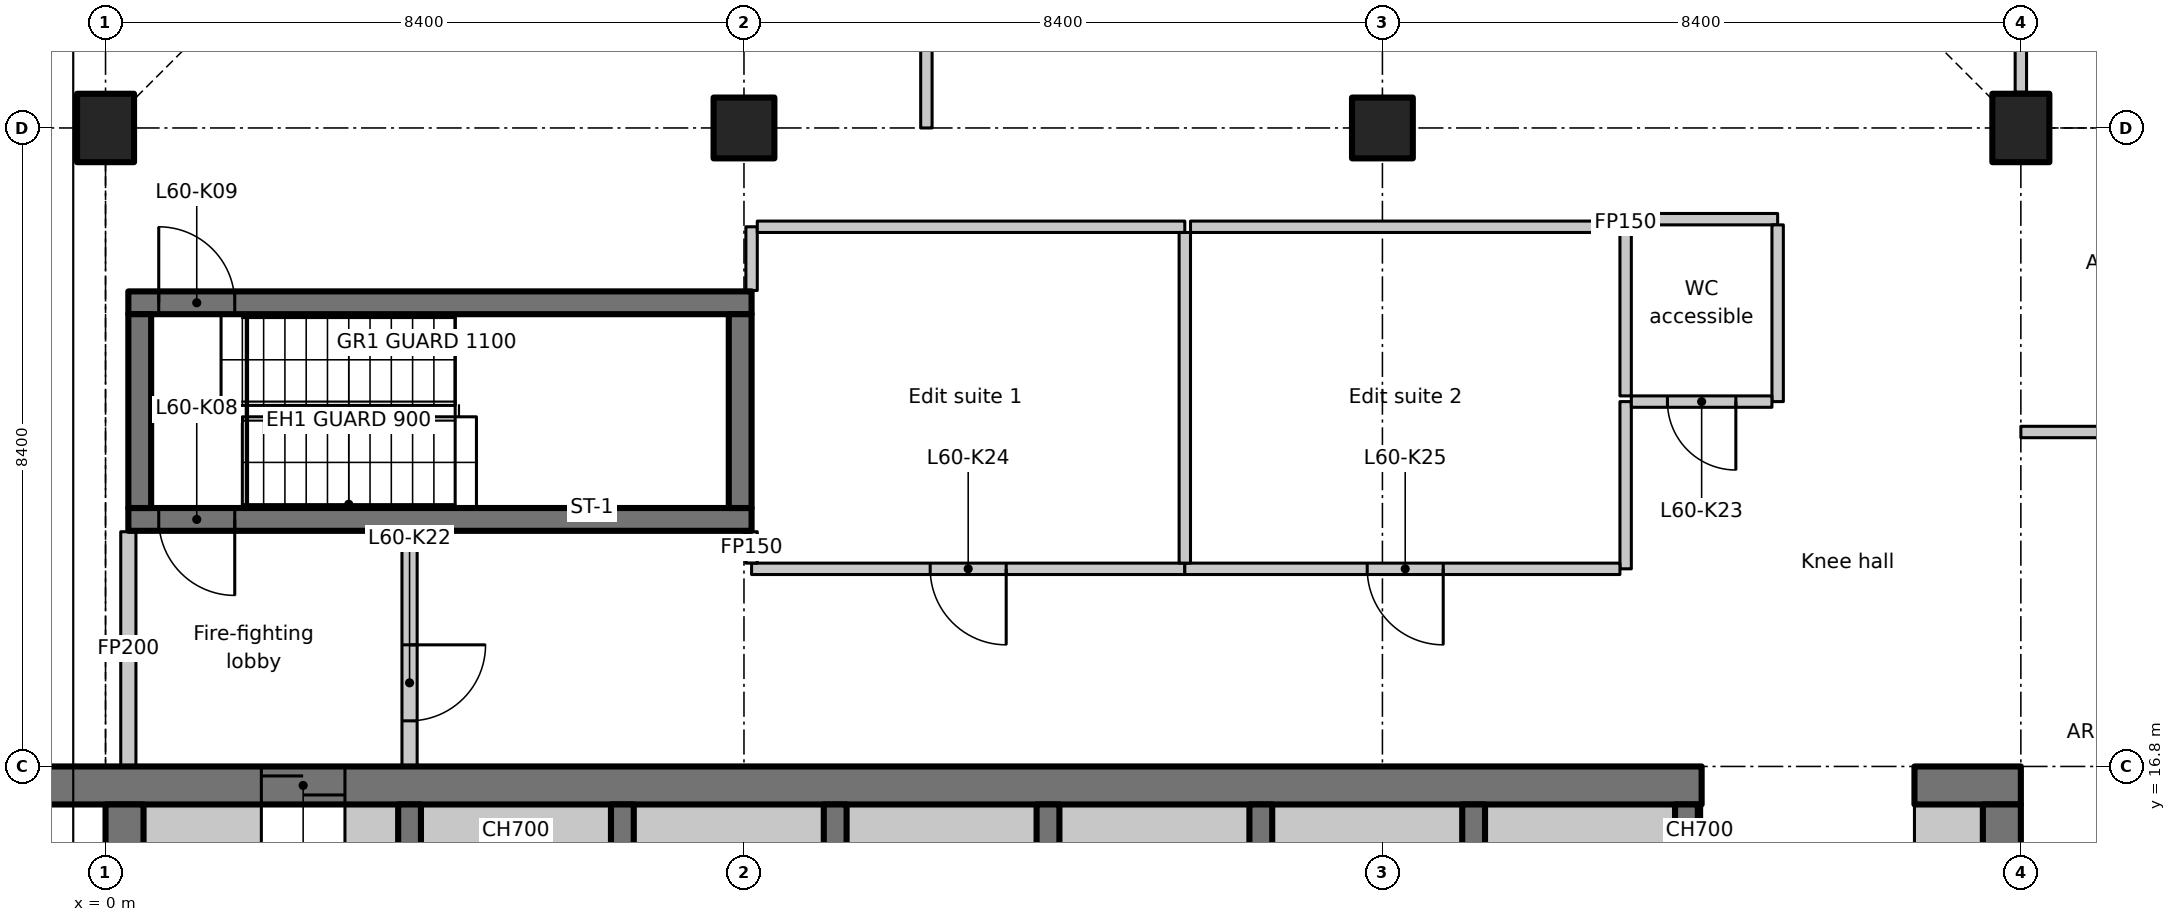
"""IFC4 building model, lengths in metres.
Left out: names, types, materials, properties, quantities, classifications, styles, units other than length and angle.
Written with IfcOpenShell. Run it as: python <this file> out.ifc"""

import sys

from ifc_helpers import new_model, si_unit, direction, frame, frame_2d, origin, origin_2d, place, context, subcontext, project, spatial, rectangle, extrude, element, fill, save


model = new_model("IFC4")
c1 = context("Model", 3, precision=1e-05, world=origin(), true_north=direction((0.0, 1.0)))
c2 = subcontext(c1, "Body", "Model", "MODEL_VIEW")
j1 = project(units=[si_unit("LENGTHUNIT", "METRE"), si_unit("PLANEANGLEUNIT", "RADIAN")], contexts=[c1])
p1 = place(None, origin())
s1 = spatial("IfcSite", under=j1, at=p1, CompositionType="ELEMENT")
p2 = place(p1, origin())
s2 = spatial("IfcBuilding", under=s1, at=p2, CompositionType="ELEMENT")
p3 = place(p2, frame((0.0, 0.0, 237.3)))
s3 = spatial("IfcBuildingStorey", under=s2, at=p3, CompositionType="ELEMENT", Elevation=237.3)
p4 = place(p3, frame((0.0, 25.2, 0.0), z_axis=(0.0, 0.0, 1.0), x_axis=(1.0, 0.0, 0.0)))
e1 = element("IfcColumn", 1, at=p4, inside=s3, PredefinedType="COLUMN", context=c2, shape_type="SweptSolid", body=[
    extrude(rectangle(XDim=0.75, YDim=0.9, at=origin_2d()), origin(), (0.0, 0.0, 1.0), 3.35),
])
for number, where, z_axis, x_axis in (
    (2, (8.4, 25.2, 0.0), (0.0, 0.0, 1.0), (1.0, 0.0, 0.0)),
    (3, (16.8, 25.2, 0.0), (0.0, 0.0, 1.0), (1.0, 0.0, 0.0)),
):
    element("IfcColumn", number, at=place(p3, frame(where, z_axis=z_axis, x_axis=x_axis)), inside=s3, PredefinedType="COLUMN", context=c2, shape_type="SweptSolid", body=[
        extrude(rectangle(XDim=0.8, YDim=0.8, at=origin_2d()), origin(), (0.0, 0.0, 1.0), 3.35),
    ])
p5 = place(p3, frame((25.2, 25.2, 0.0), z_axis=(0.0, 0.0, 1.0), x_axis=(1.0, 0.0, 0.0)))
e4 = element("IfcColumn", 4, at=p5, inside=s3, PredefinedType="COLUMN", context=c2, shape_type="SweptSolid", body=[
    extrude(rectangle(XDim=0.75, YDim=0.9, at=origin_2d()), origin(), (0.0, 0.0, 1.0), 3.35),
])
p6 = place(p3, frame((-1.1, 16.55, 0.0), z_axis=(0.0, 0.0, 1.0), x_axis=(1.0, 0.0, 0.0)))
e5 = element("IfcWall", 5, at=p6, inside=s3, PredefinedType="SHEAR", context=c2, shape_type="SweptSolid", body=[
    extrude(rectangle(XDim=22.1, YDim=0.5, at=frame_2d((11.05, 0.0))), origin(), (0.0, 0.0, 1.0), 3.35),
])
p7 = place(p6, frame((3.15, 0.0, 0.0)))
e6 = element("IfcOpeningElement", 6, at=p7, cuts=e5, PredefinedType="OPENING", context=c2, shape_type="SweptSolid", body=[
    extrude(rectangle(XDim=1.1, YDim=2.3, at=frame_2d((0.55, 1.15))), frame((0.0, 0.26, 0.0), z_axis=(0.0, -1.0, 0.0), x_axis=(1.0, 0.0, 0.0)), (0.0, 0.0, 1.0), 0.52),
])
p8 = place(p3, frame((23.8, 16.55, 0.0), z_axis=(0.0, 0.0, 1.0), x_axis=(1.0, 0.0, 0.0)))
e7 = element("IfcWall", 7, at=p8, inside=s3, PredefinedType="SHEAR", context=c2, shape_type="SweptSolid", body=[
    extrude(rectangle(XDim=1.4, YDim=0.5, at=frame_2d((0.7, 0.0))), origin(), (0.0, 0.0, 1.0), 3.35),
])
p9 = place(p3, frame((0.25, 7.436, 0.0), z_axis=(0.0, 0.0, 1.0), x_axis=(0.0, 1.0, 0.0)))
e8 = element("IfcWall", 8, at=p9, inside=s3, PredefinedType="SHEAR", context=c2, shape_type="SweptSolid", body=[
    extrude(rectangle(XDim=8.864, YDim=0.5, at=frame_2d((4.432, 0.0))), origin(), (0.0, 0.0, 1.0), 3.35),
])
p10 = place(p3, frame((24.95, 12.6, 0.0), z_axis=(0.0, 0.0, 1.0), x_axis=(0.0, 1.0, 0.0)))
e9 = element("IfcWall", 9, at=p10, inside=s3, PredefinedType="SHEAR", context=c2, shape_type="SweptSolid", body=[
    extrude(rectangle(XDim=3.7, YDim=0.5, at=frame_2d((1.85, 0.0))), origin(), (0.0, 0.0, 1.0), 3.35),
])
p11 = place(p3, frame((0.5, 15.95, 0.0), z_axis=(0.0, 0.0, 1.0), x_axis=(1.0, 0.0, 0.0)))
e10 = element("IfcWall", 10, at=p11, inside=s3, PredefinedType="PARTITIONING", context=c2, shape_type="SweptSolid", body=[
    extrude(rectangle(XDim=1.55, YDim=0.7, at=frame_2d((0.775, 0.0))), origin(), (0.0, 0.0, 1.0), 3.35),
])
p12 = place(p3, frame((23.8, 15.95, 0.0), z_axis=(0.0, 0.0, 1.0), x_axis=(1.0, 0.0, 0.0)))
e11 = element("IfcWall", 11, at=p12, inside=s3, PredefinedType="PARTITIONING", context=c2, shape_type="SweptSolid", body=[
    extrude(rectangle(XDim=0.9, YDim=0.7, at=frame_2d((0.45, 0.0))), origin(), (0.0, 0.0, 1.0), 3.35),
])
for number, where, z_axis, x_axis in (
    (12, (4.0, 12.95, 0.0), (0.0, 0.0, 1.0), (0.0, 1.0, 0.0)),
    (13, (6.8, 12.95, 0.0), (0.0, 0.0, 1.0), (0.0, 1.0, 0.0)),
    (14, (9.6, 12.95, 0.0), (0.0, 0.0, 1.0), (0.0, 1.0, 0.0)),
    (15, (12.4, 12.95, 0.0), (0.0, 0.0, 1.0), (0.0, 1.0, 0.0)),
    (16, (15.2, 12.95, 0.0), (0.0, 0.0, 1.0), (0.0, 1.0, 0.0)),
    (17, (18.0, 12.95, 0.0), (0.0, 0.0, 1.0), (0.0, 1.0, 0.0)),
    (18, (20.8, 12.95, 0.0), (0.0, 0.0, 1.0), (0.0, 1.0, 0.0)),
):
    element("IfcWall", number, at=place(p3, frame(where, z_axis=z_axis, x_axis=x_axis)), inside=s3, PredefinedType="SHEAR", context=c2, shape_type="SweptSolid", body=[
        extrude(rectangle(XDim=3.35, YDim=0.3, at=frame_2d((1.675, 0.0))), origin(), (0.0, 0.0, 1.0), 3.35),
    ])
p13 = place(p3, frame((8.5, 20.05, 0.0), z_axis=(0.0, 0.0, 1.0), x_axis=(-1.0, 0.0, 0.0)))
e19 = element("IfcWall", 19, at=p13, inside=s3, PredefinedType="SHEAR", context=c2, shape_type="SweptSolid", body=[
    extrude(rectangle(XDim=8.2, YDim=0.3, at=frame_2d((4.1, 0.0))), origin(), (0.0, 0.0, 1.0), 3.35),
])
p14 = place(p13, frame((6.8, 0.0, 0.0)))
e20 = element("IfcOpeningElement", 20, at=p14, cuts=e19, PredefinedType="OPENING", context=c2, shape_type="SweptSolid", body=[
    extrude(rectangle(XDim=1.0, YDim=2.1, at=frame_2d((0.5, 1.05))), frame((0.0, 0.16, 0.0), z_axis=(0.0, -1.0, 0.0), x_axis=(1.0, 0.0, 0.0)), (0.0, 0.0, 1.0), 0.32),
])
p15 = place(p3, frame((0.3, 22.9, 0.0), z_axis=(0.0, 0.0, 1.0), x_axis=(1.0, 0.0, 0.0)))
e21 = element("IfcWall", 21, at=p15, inside=s3, PredefinedType="SHEAR", context=c2, shape_type="SweptSolid", body=[
    extrude(rectangle(XDim=8.2, YDim=0.3, at=frame_2d((4.1, 0.0))), origin(), (0.0, 0.0, 1.0), 3.35),
])
p16 = place(p15, frame((0.4, 0.0, 0.0)))
e22 = element("IfcOpeningElement", 22, at=p16, cuts=e21, PredefinedType="OPENING", context=c2, shape_type="SweptSolid", body=[
    extrude(rectangle(XDim=1.0, YDim=2.1, at=frame_2d((0.5, 1.05))), frame((0.0, 0.16, 0.0), z_axis=(0.0, -1.0, 0.0), x_axis=(1.0, 0.0, 0.0)), (0.0, 0.0, 1.0), 0.32),
])
for number, where, z_axis, x_axis in (
    (23, (0.45, 20.2, 0.0), (0.0, 0.0, 1.0), (0.0, 1.0, 0.0)),
    (24, (8.35, 20.2, 0.0), (0.0, 0.0, 1.0), (0.0, 1.0, 0.0)),
):
    element("IfcWall", number, at=place(p3, frame(where, z_axis=z_axis, x_axis=x_axis)), inside=s3, PredefinedType="SHEAR", context=c2, shape_type="SweptSolid", body=[
        extrude(rectangle(XDim=2.55, YDim=0.3, at=frame_2d((1.275, 0.0))), origin(), (0.0, 0.0, 1.0), 3.35),
    ])
p17 = place(p3, frame((0.3, 16.812, 0.0), z_axis=(0.0, 0.0, 1.0), x_axis=(0.0, 1.0, 0.0)))
e25 = element("IfcWall", 25, at=p17, inside=s3, PredefinedType="PARTITIONING", context=c2, shape_type="SweptSolid", body=[
    extrude(rectangle(XDim=3.076, YDim=0.2, at=frame_2d((1.538, 0.0))), origin(), (0.0, 0.0, 1.0), 2.98),
])
p18 = place(p3, frame((4.0, 19.888, 0.0), z_axis=(0.0, 0.0, 1.0), x_axis=(0.0, -1.0, 0.0)))
e26 = element("IfcWall", 26, at=p18, inside=s3, PredefinedType="PARTITIONING", context=c2, shape_type="SweptSolid", body=[
    extrude(rectangle(XDim=3.076, YDim=0.2, at=frame_2d((1.538, 0.0))), origin(), (0.0, 0.0, 1.0), 3.35),
])
p19 = place(p18, frame((1.488, 0.0, 0.0)))
e27 = element("IfcOpeningElement", 27, at=p19, cuts=e26, PredefinedType="OPENING", context=c2, shape_type="SweptSolid", body=[
    extrude(rectangle(XDim=1.0, YDim=2.1, at=frame_2d((0.5, 1.05))), frame((0.0, 0.11, 0.0), z_axis=(0.0, -1.0, 0.0), x_axis=(1.0, 0.0, 0.0)), (0.0, 0.0, 1.0), 0.22),
])
p20 = place(p3, frame((14.2, 19.4, 0.0), z_axis=(0.0, 0.0, 1.0), x_axis=(-1.0, 0.0, 0.0)))
e28 = element("IfcWall", 28, at=p20, inside=s3, PredefinedType="PARTITIONING", context=c2, shape_type="SweptSolid", body=[
    extrude(rectangle(XDim=5.7, YDim=0.15, at=frame_2d((2.85, 0.0))), origin(), (0.0, 0.0, 1.0), 3.35),
])
p21 = place(p20, frame((2.35, 0.0, 0.0)))
e29 = element("IfcOpeningElement", 29, at=p21, cuts=e28, PredefinedType="OPENING", context=c2, shape_type="SweptSolid", body=[
    extrude(rectangle(XDim=1.0, YDim=2.1, at=frame_2d((0.5, 1.05))), frame((0.0, 0.085, 0.0), z_axis=(0.0, -1.0, 0.0), x_axis=(1.0, 0.0, 0.0)), (0.0, 0.0, 1.0), 0.17),
])
p22 = place(p3, frame((8.5, 19.475, 0.0), z_axis=(0.0, 0.0, 1.0), x_axis=(0.0, 1.0, 0.0)))
e30 = element("IfcWall", 30, at=p22, inside=s3, PredefinedType="PARTITIONING", context=c2, shape_type="SweptSolid", body=[
    extrude(rectangle(XDim=0.413, YDim=0.15, at=frame_2d((0.207, 0.0))), origin(), (0.0, 0.0, 1.0), 3.35),
])
p23 = place(p3, frame((8.5, 23.062, 0.0), z_axis=(0.0, 0.0, 1.0), x_axis=(0.0, 1.0, 0.0)))
e31 = element("IfcWall", 31, at=p23, inside=s3, PredefinedType="PARTITIONING", context=c2, shape_type="SweptSolid", body=[
    extrude(rectangle(XDim=0.838, YDim=0.15, at=frame_2d((0.419, 0.0))), origin(), (0.0, 0.0, 1.0), 3.35),
])
p24 = place(p3, frame((8.575, 23.9, 0.0), z_axis=(0.0, 0.0, 1.0), x_axis=(1.0, 0.0, 0.0)))
e32 = element("IfcWall", 32, at=p24, inside=s3, PredefinedType="PARTITIONING", context=c2, shape_type="SweptSolid", body=[
    extrude(rectangle(XDim=5.625, YDim=0.15, at=frame_2d((2.812, 0.0))), origin(), (0.0, 0.0, 1.0), 3.35),
])
p25 = place(p3, frame((20.0, 21.6, 0.0), z_axis=(0.0, 0.0, 1.0), x_axis=(0.0, -1.0, 0.0)))
e33 = element("IfcWall", 33, at=p25, inside=s3, PredefinedType="PARTITIONING", context=c2, shape_type="SweptSolid", body=[
    extrude(rectangle(XDim=2.2, YDim=0.15, at=frame_2d((1.1, 0.0))), origin(), (0.0, 0.0, 1.0), 3.35),
])
p26 = place(p3, frame((19.925, 19.4, 0.0), z_axis=(0.0, 0.0, 1.0), x_axis=(-1.0, 0.0, 0.0)))
e34 = element("IfcWall", 34, at=p26, inside=s3, PredefinedType="PARTITIONING", context=c2, shape_type="SweptSolid", body=[
    extrude(rectangle(XDim=5.725, YDim=0.15, at=frame_2d((2.863, 0.0))), origin(), (0.0, 0.0, 1.0), 3.35),
])
p27 = place(p26, frame((2.325, 0.0, 0.0)))
e35 = element("IfcOpeningElement", 35, at=p27, cuts=e34, PredefinedType="OPENING", context=c2, shape_type="SweptSolid", body=[
    extrude(rectangle(XDim=1.0, YDim=2.1, at=frame_2d((0.5, 1.05))), frame((0.0, 0.085, 0.0), z_axis=(0.0, -1.0, 0.0), x_axis=(1.0, 0.0, 0.0)), (0.0, 0.0, 1.0), 0.17),
])
p28 = place(p3, frame((14.2, 23.825, 0.0), z_axis=(0.0, 0.0, 1.0), x_axis=(0.0, -1.0, 0.0)))
e36 = element("IfcWall", 36, at=p28, inside=s3, PredefinedType="PARTITIONING", context=c2, shape_type="SweptSolid", body=[
    extrude(rectangle(XDim=4.35, YDim=0.15, at=frame_2d((2.175, 0.0))), origin(), (0.0, 0.0, 1.0), 3.35),
])
p29 = place(p3, frame((14.275, 23.9, 0.0), z_axis=(0.0, 0.0, 1.0), x_axis=(1.0, 0.0, 0.0)))
e37 = element("IfcWall", 37, at=p29, inside=s3, PredefinedType="PARTITIONING", context=c2, shape_type="SweptSolid", body=[
    extrude(rectangle(XDim=5.725, YDim=0.15, at=frame_2d((2.863, 0.0))), origin(), (0.0, 0.0, 1.0), 3.35),
])
p30 = place(p3, frame((20.0, 23.9, 0.0), z_axis=(0.0, 0.0, 1.0), x_axis=(0.0, 1.0, 0.0)))
e38 = element("IfcWall", 38, at=p30, inside=s3, PredefinedType="PARTITIONING", context=c2, shape_type="SweptSolid", body=[
    extrude(rectangle(XDim=0.1, YDim=0.15, at=frame_2d((0.05, 0.0))), origin(), (0.0, 0.0, 1.0), 3.35),
])
p31 = place(p3, frame((20.075, 24.0, 0.0), z_axis=(0.0, 0.0, 1.0), x_axis=(1.0, 0.0, 0.0)))
e39 = element("IfcWall", 39, at=p31, inside=s3, PredefinedType="PARTITIONING", context=c2, shape_type="SweptSolid", body=[
    extrude(rectangle(XDim=1.925, YDim=0.15, at=frame_2d((0.962, 0.0))), origin(), (0.0, 0.0, 1.0), 3.35),
])
p32 = place(p3, frame((22.0, 23.925, 0.0), z_axis=(0.0, 0.0, 1.0), x_axis=(0.0, -1.0, 0.0)))
e40 = element("IfcWall", 40, at=p32, inside=s3, PredefinedType="PARTITIONING", context=c2, shape_type="SweptSolid", body=[
    extrude(rectangle(XDim=2.325, YDim=0.15, at=frame_2d((1.163, 0.0))), origin(), (0.0, 0.0, 1.0), 3.35),
])
p33 = place(p3, frame((21.925, 21.6, 0.0), z_axis=(0.0, 0.0, 1.0), x_axis=(-1.0, 0.0, 0.0)))
e41 = element("IfcWall", 41, at=p33, inside=s3, PredefinedType="PARTITIONING", context=c2, shape_type="SweptSolid", body=[
    extrude(rectangle(XDim=1.85, YDim=0.15, at=frame_2d((0.925, 0.0))), origin(), (0.0, 0.0, 1.0), 3.35),
])
p34 = place(p33, frame((0.475, 0.0, 0.0)))
e42 = element("IfcOpeningElement", 42, at=p34, cuts=e41, PredefinedType="OPENING", context=c2, shape_type="SweptSolid", body=[
    extrude(rectangle(XDim=0.9, YDim=2.1, at=frame_2d((0.45, 1.05))), frame((0.0, 0.085, 0.0), z_axis=(0.0, -1.0, 0.0), x_axis=(1.0, 0.0, 0.0)), (0.0, 0.0, 1.0), 0.17),
])
p35 = place(p3, frame((20.0, 21.675, 0.0), z_axis=(0.0, 0.0, 1.0), x_axis=(0.0, 1.0, 0.0)))
e43 = element("IfcWall", 43, at=p35, inside=s3, PredefinedType="PARTITIONING", context=c2, shape_type="SweptSolid", body=[
    extrude(rectangle(XDim=2.15, YDim=0.15, at=frame_2d((1.075, 0.0))), origin(), (0.0, 0.0, 1.0), 3.35),
])
p36 = place(p3, frame((3.15, 15.95, 0.0), z_axis=(0.0, 0.0, 1.0), x_axis=(1.0, 0.0, 0.0)))
e44 = element("IfcWall", 44, at=p36, inside=s3, PredefinedType="PARTITIONING", context=c2, shape_type="SweptSolid", body=[
    extrude(rectangle(XDim=0.7, YDim=0.7, at=frame_2d((0.35, 0.0))), origin(), (0.0, 0.0, 1.0), 3.35),
])
for number, where, z_axis, x_axis in (
    (45, (4.15, 15.95, 0.0), (0.0, 0.0, 1.0), (1.0, 0.0, 0.0)),
    (46, (6.95, 15.95, 0.0), (0.0, 0.0, 1.0), (1.0, 0.0, 0.0)),
    (47, (9.75, 15.95, 0.0), (0.0, 0.0, 1.0), (1.0, 0.0, 0.0)),
    (48, (12.55, 15.95, 0.0), (0.0, 0.0, 1.0), (1.0, 0.0, 0.0)),
    (49, (15.35, 15.95, 0.0), (0.0, 0.0, 1.0), (1.0, 0.0, 0.0)),
    (50, (18.15, 15.95, 0.0), (0.0, 0.0, 1.0), (1.0, 0.0, 0.0)),
):
    element("IfcWall", number, at=place(p3, frame(where, z_axis=z_axis, x_axis=x_axis)), inside=s3, PredefinedType="PARTITIONING", context=c2, shape_type="SweptSolid", body=[
        extrude(rectangle(XDim=2.5, YDim=0.7, at=frame_2d((1.25, 0.0))), origin(), (0.0, 0.0, 1.0), 3.35),
    ])
p37 = place(p3, frame((20.95, 15.95, 0.0), z_axis=(0.0, 0.0, 1.0), x_axis=(1.0, 0.0, 0.0)))
e51 = element("IfcWall", 51, at=p37, inside=s3, PredefinedType="PARTITIONING", context=c2, shape_type="SweptSolid", body=[
    extrude(rectangle(XDim=0.05, YDim=0.7, at=frame_2d((0.025, 0.0))), origin(), (0.0, 0.0, 1.0), 3.35),
])
p38 = place(p3, frame((25.2, 21.2, 0.0), z_axis=(0.0, 0.0, 1.0), x_axis=(1.0, 0.0, 0.0)))
e52 = element("IfcWall", 52, at=p38, inside=s3, PredefinedType="PARTITIONING", context=c2, shape_type="SweptSolid", body=[
    extrude(rectangle(XDim=4.2, YDim=0.15, at=frame_2d((2.1, 0.0))), origin(), (0.0, 0.0, 1.0), 3.33),
])
p39 = place(p38, frame((1.5, 0.0, 0.0)))
e53 = element("IfcOpeningElement", 53, at=p39, cuts=e52, PredefinedType="OPENING", context=c2, shape_type="SweptSolid", body=[
    extrude(rectangle(XDim=1.0, YDim=2.1, at=frame_2d((0.5, 1.05))), frame((0.0, 0.085, 0.0), z_axis=(0.0, -1.0, 0.0), x_axis=(1.0, 0.0, 0.0)), (0.0, 0.0, 1.0), 0.17),
])
p40 = place(p3, frame((25.2, 25.67, 0.0), z_axis=(0.0, 0.0, 1.0), x_axis=(0.0, 1.0, 0.0)))
e54 = element("IfcWall", 54, at=p40, inside=s3, PredefinedType="PARTITIONING", context=c2, shape_type="SweptSolid", body=[
    extrude(rectangle(XDim=3.93, YDim=0.15, at=frame_2d((1.965, 0.0))), origin(), (0.0, 0.0, 1.0), 2.98),
])
p41 = place(p3, frame((10.8, 25.2, 0.0), z_axis=(0.0, 0.0, 1.0), x_axis=(0.0, 1.0, 0.0)))
e55 = element("IfcWall", 55, at=p41, inside=s3, PredefinedType="PARTITIONING", context=c2, shape_type="SweptSolid", body=[
    extrude(rectangle(XDim=4.2, YDim=0.15, at=frame_2d((2.1, 0.0))), origin(), (0.0, 0.0, 1.0), 3.33),
])
p42 = place(p41, frame((1.5, 0.0, 0.0)))
e56 = element("IfcOpeningElement", 56, at=p42, cuts=e55, PredefinedType="OPENING", context=c2, shape_type="SweptSolid", body=[
    extrude(rectangle(XDim=1.1, YDim=2.1, at=frame_2d((0.55, 1.05))), frame((0.0, 0.085, 0.0), z_axis=(0.0, -1.0, 0.0), x_axis=(1.0, 0.0, 0.0)), (0.0, 0.0, 1.0), 0.17),
])
p43 = place(p7, origin())
e57 = element("IfcDoor", 57, at=p43, inside=s3, OperationType="SLIDING_TO_LEFT", PredefinedType="DOOR", context=c2, shape_type="SweptSolid", body=[
    extrude(rectangle(XDim=1.1, YDim=2.3, at=frame_2d((0.55, 1.15))), frame((0.0, 0.025, 0.0), z_axis=(0.0, -1.0, 0.0), x_axis=(1.0, 0.0, 0.0)), (0.0, 0.0, 1.0), 0.05),
])
fill(e6, e57)
p44 = place(p14, origin())
e58 = element("IfcDoor", 58, at=p44, inside=s3, OperationType="SINGLE_SWING_LEFT", PredefinedType="DOOR", context=c2, shape_type="SweptSolid", body=[
    extrude(rectangle(XDim=1.0, YDim=2.1, at=frame_2d((0.5, 1.05))), frame((0.0, 0.025, 0.0), z_axis=(0.0, -1.0, 0.0), x_axis=(1.0, 0.0, 0.0)), (0.0, 0.0, 1.0), 0.05),
])
fill(e20, e58)
p45 = place(p16, origin())
e59 = element("IfcDoor", 59, at=p45, inside=s3, OperationType="SINGLE_SWING_RIGHT", PredefinedType="DOOR", context=c2, shape_type="SweptSolid", body=[
    extrude(rectangle(XDim=1.0, YDim=2.1, at=frame_2d((0.5, 1.05))), frame((0.0, 0.025, 0.0), z_axis=(0.0, -1.0, 0.0), x_axis=(1.0, 0.0, 0.0)), (0.0, 0.0, 1.0), 0.05),
])
fill(e22, e59)
p46 = place(p19, origin())
e60 = element("IfcDoor", 60, at=p46, inside=s3, OperationType="SINGLE_SWING_LEFT", PredefinedType="DOOR", context=c2, shape_type="SweptSolid", body=[
    extrude(rectangle(XDim=1.0, YDim=2.1, at=frame_2d((0.5, 1.05))), frame((0.0, 0.025, 0.0), z_axis=(0.0, -1.0, 0.0), x_axis=(1.0, 0.0, 0.0)), (0.0, 0.0, 1.0), 0.05),
])
fill(e27, e60)
p47 = place(p34, origin())
e61 = element("IfcDoor", 61, at=p47, inside=s3, OperationType="SINGLE_SWING_RIGHT", PredefinedType="DOOR", context=c2, shape_type="SweptSolid", body=[
    extrude(rectangle(XDim=0.9, YDim=2.1, at=frame_2d((0.45, 1.05))), frame((0.0, 0.025, 0.0), z_axis=(0.0, -1.0, 0.0), x_axis=(1.0, 0.0, 0.0)), (0.0, 0.0, 1.0), 0.05),
])
fill(e42, e61)
p48 = place(p21, origin())
e62 = element("IfcDoor", 62, at=p48, inside=s3, OperationType="SINGLE_SWING_LEFT", PredefinedType="DOOR", context=c2, shape_type="SweptSolid", body=[
    extrude(rectangle(XDim=1.0, YDim=2.1, at=frame_2d((0.5, 1.05))), frame((0.0, 0.025, 0.0), z_axis=(0.0, -1.0, 0.0), x_axis=(1.0, 0.0, 0.0)), (0.0, 0.0, 1.0), 0.05),
])
fill(e29, e62)
p49 = place(p27, origin())
e63 = element("IfcDoor", 63, at=p49, inside=s3, OperationType="SINGLE_SWING_RIGHT", PredefinedType="DOOR", context=c2, shape_type="SweptSolid", body=[
    extrude(rectangle(XDim=1.0, YDim=2.1, at=frame_2d((0.5, 1.05))), frame((0.0, 0.025, 0.0), z_axis=(0.0, -1.0, 0.0), x_axis=(1.0, 0.0, 0.0)), (0.0, 0.0, 1.0), 0.05),
])
fill(e35, e63)
save(model, sys.argv[1])
